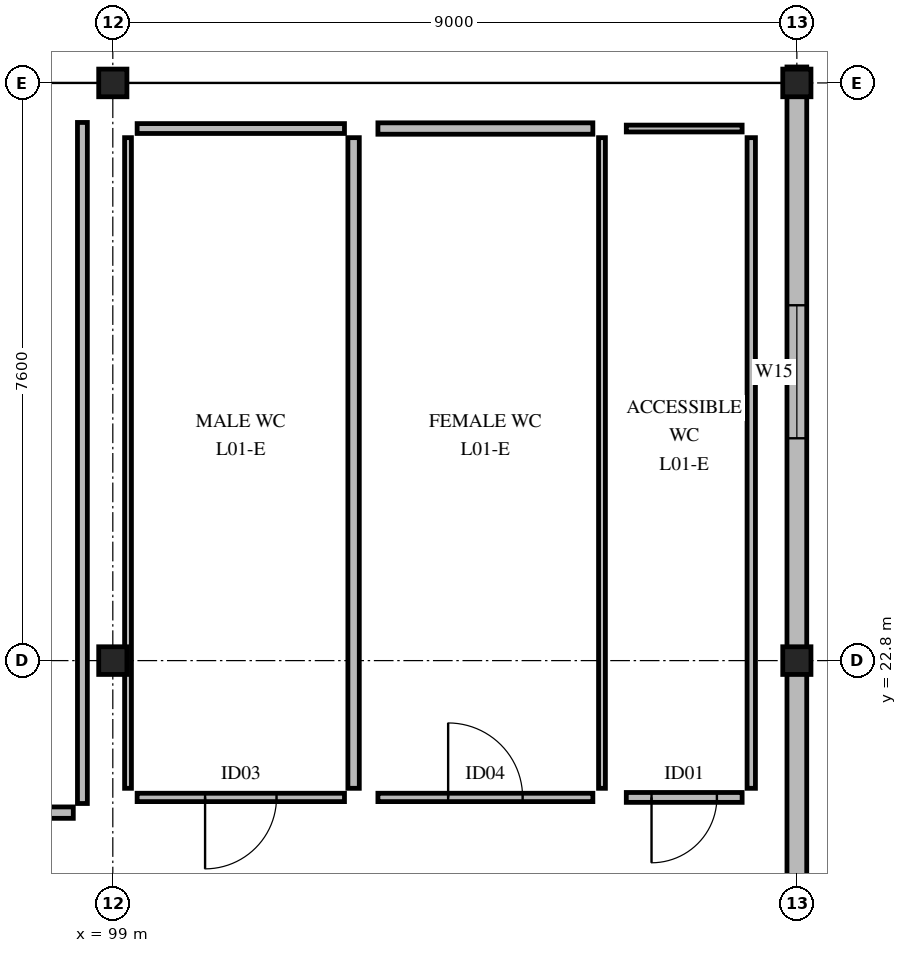
"""IFC4 building model, lengths in metres.
Left out: names, types, materials, properties, quantities, classifications, styles, units other than length and angle.
Written with IfcOpenShell. Run it as: python <this file> out.ifc"""

import sys

from ifc_helpers import new_model, si_unit, direction, frame, frame_2d, origin, origin_2d, place, context, subcontext, project, spatial, rectangle, i_section, extrude, element, fill, save


model = new_model("IFC4")
c1 = context("Model", 3, precision=1e-05, world=origin(), true_north=direction((0.0, 1.0)))
c2 = subcontext(c1, "Body", "Model", "MODEL_VIEW")
j1 = project(units=[si_unit("LENGTHUNIT", "METRE"), si_unit("PLANEANGLEUNIT", "RADIAN")], contexts=[c1])
p1 = place(None, origin())
s1 = spatial("IfcSite", under=j1, at=p1, CompositionType="ELEMENT")
p2 = place(p1, origin())
s2 = spatial("IfcBuilding", under=s1, at=p2, CompositionType="ELEMENT")
p3 = place(p2, frame((0.0, 0.0, 5.04)))
s3 = spatial("IfcBuildingStorey", under=s2, at=p3, CompositionType="ELEMENT", Elevation=5.04)
for number, where, z_axis, x_axis in (
    (1, (99.0, 22.8, 0.0), (0.0, 0.0, 1.0), (1.0, 0.0, 0.0)),
    (2, (99.0, 30.4, 0.0), (0.0, 0.0, 1.0), (1.0, 0.0, 0.0)),
    (3, (108.0, 22.8, 0.0), (0.0, 0.0, 1.0), (1.0, 0.0, 0.0)),
    (4, (108.0, 30.4, 0.0), (0.0, 0.0, 1.0), (1.0, 0.0, 0.0)),
):
    element("IfcColumn", number, at=place(p3, frame(where, z_axis=z_axis, x_axis=x_axis)), inside=s3, PredefinedType="COLUMN", context=c2, shape_type="SweptSolid", body=[
        extrude(i_section(OverallWidth=0.371, OverallDepth=0.364, WebThickness=0.013, FlangeThickness=0.022, FilletRadius=0.018, at=origin_2d()), origin(), (0.0, 0.0, 1.0), 4.32),
    ])
p4 = place(p3, frame((108.0, 15.2, 0.0), z_axis=(0.0, 0.0, 1.0), x_axis=(0.0, 1.0, 0.0)))
e5 = element("IfcWall", 5, at=p4, inside=s3, PredefinedType="STANDARD", context=c2, shape_type="SweptSolid", body=[
    extrude(rectangle(XDim=7.6, YDim=0.26, at=frame_2d((3.8, 0.0))), origin(), (0.0, 0.0, 1.0), 3.599),
])
p5 = place(p4, frame((3.0, 0.0, 0.85)))
e6 = element("IfcOpeningElement", 6, at=p5, cuts=e5, PredefinedType="OPENING", context=c2, shape_type="SweptSolid", body=[
    extrude(rectangle(XDim=1.6, YDim=1.35, at=frame_2d((0.8, 0.675))), frame((0.0, 0.14, 0.0), z_axis=(0.0, -1.0, 0.0), x_axis=(1.0, 0.0, 0.0)), (0.0, 0.0, 1.0), 0.28),
])
p6 = place(p3, frame((108.0, 22.8, 0.0), z_axis=(0.0, 0.0, 1.0), x_axis=(0.0, 1.0, 0.0)))
e7 = element("IfcWall", 7, at=p6, inside=s3, PredefinedType="STANDARD", context=c2, shape_type="SweptSolid", body=[
    extrude(rectangle(XDim=7.81, YDim=0.26, at=frame_2d((3.905, 0.0))), origin(), (0.0, 0.0, 1.0), 4.06),
])
p7 = place(p6, frame((2.925, 0.0, 0.85)))
e8 = element("IfcOpeningElement", 8, at=p7, cuts=e7, PredefinedType="OPENING", context=c2, shape_type="SweptSolid", body=[
    extrude(rectangle(XDim=1.75, YDim=1.35, at=frame_2d((0.875, 0.675))), frame((0.0, 0.14, 0.0), z_axis=(0.0, -1.0, 0.0), x_axis=(1.0, 0.0, 0.0)), (0.0, 0.0, 1.0), 0.28),
])
p8 = place(p3, frame((54.52, 20.8, 0.0), z_axis=(0.0, 0.0, 1.0), x_axis=(1.0, 0.0, 0.0)))
e9 = element("IfcWall", 9, at=p8, inside=s3, PredefinedType="PARTITIONING", context=c2, shape_type="SweptSolid", body=[
    extrude(rectangle(XDim=43.96, YDim=0.15, at=frame_2d((21.98, 0.0))), origin(), (0.0, 0.0, 1.0), 4.04),
])
p9 = place(p8, frame((21.06, 0.0, 0.0)))
e10 = element("IfcOpeningElement", 10, at=p9, cuts=e9, PredefinedType="OPENING", context=c2, shape_type="SweptSolid", body=[
    extrude(rectangle(XDim=1.0, YDim=2.15, at=frame_2d((0.5, 1.075))), frame((0.0, 0.085, 0.0), z_axis=(0.0, -1.0, 0.0), x_axis=(1.0, 0.0, 0.0)), (0.0, 0.0, 1.0), 0.17),
])
p10 = place(p3, frame((98.6, 20.92, 0.0), z_axis=(0.0, 0.0, 1.0), x_axis=(0.0, 1.0, 0.0)))
e11 = element("IfcWall", 11, at=p10, inside=s3, PredefinedType="PARTITIONING", context=c2, shape_type="SweptSolid", body=[
    extrude(rectangle(XDim=8.96, YDim=0.13, at=frame_2d((4.48, 0.0))), origin(), (0.0, 0.0, 1.0), 4.04),
])
p11 = place(p3, frame((99.32, 21.0, 0.0), z_axis=(0.0, 0.0, 1.0), x_axis=(1.0, 0.0, 0.0)))
e12 = element("IfcWall", 12, at=p11, inside=s3, PredefinedType="PARTITIONING", context=c2, shape_type="SweptSolid", body=[
    extrude(rectangle(XDim=2.728, YDim=0.11, at=frame_2d((1.364, 0.0))), origin(), (0.0, 0.0, 1.0), 4.04),
])
p12 = place(p11, frame((0.894, 0.0, 0.0)))
e13 = element("IfcOpeningElement", 13, at=p12, cuts=e12, PredefinedType="OPENING", context=c2, shape_type="SweptSolid", body=[
    extrude(rectangle(XDim=0.94, YDim=2.06, at=frame_2d((0.47, 1.03))), frame((0.0, 0.065, 0.0), z_axis=(0.0, -1.0, 0.0), x_axis=(1.0, 0.0, 0.0)), (0.0, 0.0, 1.0), 0.13),
])
p13 = place(p3, frame((99.2, 21.12, 0.0), z_axis=(0.0, 0.0, 1.0), x_axis=(0.0, 1.0, 0.0)))
e14 = element("IfcWall", 14, at=p13, inside=s3, PredefinedType="PARTITIONING", context=c2, shape_type="SweptSolid", body=[
    extrude(rectangle(XDim=8.56, YDim=0.09, at=frame_2d((4.28, 0.0))), origin(), (0.0, 0.0, 1.0), 3.599),
])
p14 = place(p3, frame((102.168, 21.12, 0.0), z_axis=(0.0, 0.0, 1.0), x_axis=(0.0, 1.0, 0.0)))
e15 = element("IfcWall", 15, at=p14, inside=s3, PredefinedType="PARTITIONING", context=c2, shape_type="SweptSolid", body=[
    extrude(rectangle(XDim=8.56, YDim=0.15, at=frame_2d((4.28, 0.0))), origin(), (0.0, 0.0, 1.0), 4.04),
])
p15 = place(p3, frame((99.32, 29.8, 0.0), z_axis=(0.0, 0.0, 1.0), x_axis=(1.0, 0.0, 0.0)))
e16 = element("IfcWall", 16, at=p15, inside=s3, PredefinedType="PARTITIONING", context=c2, shape_type="SweptSolid", body=[
    extrude(rectangle(XDim=2.728, YDim=0.13, at=frame_2d((1.364, 0.0))), origin(), (0.0, 0.0, 1.0), 4.04),
])
p16 = place(p3, frame((102.488, 21.0, 0.0), z_axis=(0.0, 0.0, 1.0), x_axis=(1.0, 0.0, 0.0)))
e17 = element("IfcWall", 17, at=p16, inside=s3, PredefinedType="PARTITIONING", context=c2, shape_type="SweptSolid", body=[
    extrude(rectangle(XDim=2.828, YDim=0.11, at=frame_2d((1.414, 0.0))), origin(), (0.0, 0.0, 1.0), 4.04),
])
p17 = place(p16, frame((0.924, 0.0, 0.0)))
e18 = element("IfcOpeningElement", 18, at=p17, cuts=e17, PredefinedType="OPENING", context=c2, shape_type="SweptSolid", body=[
    extrude(rectangle(XDim=0.98, YDim=2.06, at=frame_2d((0.49, 1.03))), frame((0.0, 0.065, 0.0), z_axis=(0.0, -1.0, 0.0), x_axis=(1.0, 0.0, 0.0)), (0.0, 0.0, 1.0), 0.13),
])
p18 = place(p3, frame((105.436, 21.12, 0.0), z_axis=(0.0, 0.0, 1.0), x_axis=(0.0, 1.0, 0.0)))
e19 = element("IfcWall", 19, at=p18, inside=s3, PredefinedType="PARTITIONING", context=c2, shape_type="SweptSolid", body=[
    extrude(rectangle(XDim=8.56, YDim=0.09, at=frame_2d((4.28, 0.0))), origin(), (0.0, 0.0, 1.0), 4.04),
])
p19 = place(p3, frame((102.488, 29.8, 0.0), z_axis=(0.0, 0.0, 1.0), x_axis=(1.0, 0.0, 0.0)))
e20 = element("IfcWall", 20, at=p19, inside=s3, PredefinedType="PARTITIONING", context=c2, shape_type="SweptSolid", body=[
    extrude(rectangle(XDim=2.828, YDim=0.15, at=frame_2d((1.414, 0.0))), origin(), (0.0, 0.0, 1.0), 4.04),
])
p20 = place(p3, frame((105.756, 21.0, 0.0), z_axis=(0.0, 0.0, 1.0), x_axis=(1.0, 0.0, 0.0)))
e21 = element("IfcWall", 21, at=p20, inside=s3, PredefinedType="PARTITIONING", context=c2, shape_type="SweptSolid", body=[
    extrude(rectangle(XDim=1.524, YDim=0.13, at=frame_2d((0.762, 0.0))), origin(), (0.0, 0.0, 1.0), 4.04),
])
p21 = place(p20, frame((0.332, 0.0, 0.0)))
e22 = element("IfcOpeningElement", 22, at=p21, cuts=e21, PredefinedType="OPENING", context=c2, shape_type="SweptSolid", body=[
    extrude(rectangle(XDim=0.86, YDim=2.06, at=frame_2d((0.43, 1.03))), frame((0.0, 0.075, 0.0), z_axis=(0.0, -1.0, 0.0), x_axis=(1.0, 0.0, 0.0)), (0.0, 0.0, 1.0), 0.15),
])
p22 = place(p3, frame((107.4, 21.12, 0.0), z_axis=(0.0, 0.0, 1.0), x_axis=(0.0, 1.0, 0.0)))
e23 = element("IfcWall", 23, at=p22, inside=s3, PredefinedType="PARTITIONING", context=c2, shape_type="SweptSolid", body=[
    extrude(rectangle(XDim=8.56, YDim=0.11, at=frame_2d((4.28, 0.0))), origin(), (0.0, 0.0, 1.0), 4.04),
])
p23 = place(p3, frame((105.756, 29.8, 0.0), z_axis=(0.0, 0.0, 1.0), x_axis=(1.0, 0.0, 0.0)))
e24 = element("IfcWall", 24, at=p23, inside=s3, PredefinedType="PARTITIONING", context=c2, shape_type="SweptSolid", body=[
    extrude(rectangle(XDim=1.524, YDim=0.09, at=frame_2d((0.762, 0.0))), origin(), (0.0, 0.0, 1.0), 4.04),
])
p24 = place(p7, origin())
e25 = element("IfcWindow", 25, at=p24, inside=s3, PartitioningType="SINGLE_PANEL", PredefinedType="WINDOW", context=c2, shape_type="SweptSolid", body=[
    extrude(rectangle(XDim=1.75, YDim=1.35, at=frame_2d((0.875, 0.675))), frame((0.0, 0.03, 0.0), z_axis=(0.0, -1.0, 0.0), x_axis=(1.0, 0.0, 0.0)), (0.0, 0.0, 1.0), 0.06),
])
fill(e8, e25)
p25 = place(p12, origin())
e26 = element("IfcDoor", 26, at=p25, inside=s3, OperationType="SINGLE_SWING_RIGHT", PredefinedType="DOOR", context=c2, shape_type="SweptSolid", body=[
    extrude(rectangle(XDim=0.94, YDim=2.06, at=frame_2d((0.47, 1.03))), frame((0.0, 0.025, 0.0), z_axis=(0.0, -1.0, 0.0), x_axis=(1.0, 0.0, 0.0)), (0.0, 0.0, 1.0), 0.05),
])
fill(e13, e26)
p26 = place(p17, origin())
e27 = element("IfcDoor", 27, at=p26, inside=s3, OperationType="SINGLE_SWING_LEFT", PredefinedType="DOOR", context=c2, shape_type="SweptSolid", body=[
    extrude(rectangle(XDim=0.98, YDim=2.06, at=frame_2d((0.49, 1.03))), frame((0.0, 0.025, 0.0), z_axis=(0.0, -1.0, 0.0), x_axis=(1.0, 0.0, 0.0)), (0.0, 0.0, 1.0), 0.05),
])
fill(e18, e27)
p27 = place(p21, origin())
e28 = element("IfcDoor", 28, at=p27, inside=s3, OperationType="SINGLE_SWING_RIGHT", PredefinedType="DOOR", context=c2, shape_type="SweptSolid", body=[
    extrude(rectangle(XDim=0.86, YDim=2.06, at=frame_2d((0.43, 1.03))), frame((0.0, 0.025, 0.0), z_axis=(0.0, -1.0, 0.0), x_axis=(1.0, 0.0, 0.0)), (0.0, 0.0, 1.0), 0.05),
])
fill(e22, e28)
save(model, sys.argv[1])
